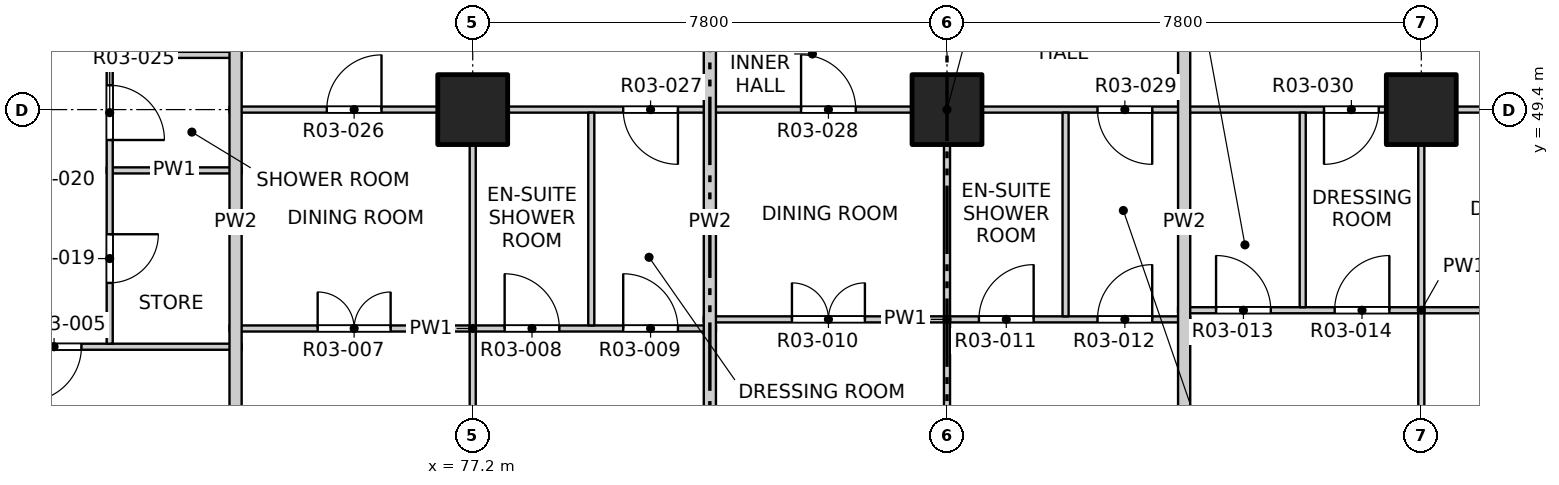
"""IFC4 building model, lengths in metres.
Left out: names, types, materials, properties, quantities, classifications, styles, units other than length and angle.
Written with IfcOpenShell. Run it as: python <this file> out.ifc"""

import sys

from ifc_helpers import new_model, si_unit, direction, frame, frame_2d, origin, origin_2d, place, context, subcontext, project, spatial, rectangle, extrude, element, fill, save


model = new_model("IFC4")
c1 = context("Model", 3, precision=1e-05, world=origin(), true_north=direction((0.0, 1.0)))
c2 = subcontext(c1, "Body", "Model", "MODEL_VIEW")
j1 = project(units=[si_unit("LENGTHUNIT", "METRE"), si_unit("PLANEANGLEUNIT", "RADIAN")], contexts=[c1])
p1 = place(None, origin())
s1 = spatial("IfcSite", under=j1, at=p1, CompositionType="ELEMENT")
p2 = place(p1, origin())
s2 = spatial("IfcBuilding", under=s1, at=p2, CompositionType="ELEMENT")
p3 = place(p2, frame((0.0, 0.0, 43.3)))
s3 = spatial("IfcBuildingStorey", under=s2, at=p3, CompositionType="ELEMENT", Elevation=43.3)
for number, where, z_axis, x_axis in (
    (1, (77.2, 49.4, -0.25), (0.0, 0.0, 1.0), (1.0, 0.0, 0.0)),
    (2, (85.0, 49.4, -0.25), (0.0, 0.0, 1.0), (1.0, 0.0, 0.0)),
    (3, (92.8, 49.4, -0.25), (0.0, 0.0, 1.0), (1.0, 0.0, 0.0)),
):
    element("IfcColumn", number, at=place(p3, frame(where, z_axis=z_axis, x_axis=x_axis)), inside=s3, PredefinedType="COLUMN", context=c2, shape_type="SweptSolid", body=[
        extrude(rectangle(XDim=1.15, YDim=1.15, at=origin_2d()), origin(), (0.0, 0.0, 1.0), 3.35),
    ])
p4 = place(p3, frame((61.9, 45.5, 0.0), z_axis=(0.0, 0.0, 1.0), x_axis=(1.0, 0.0, 0.0)))
e4 = element("IfcWall", 4, at=p4, inside=s3, PredefinedType="PARTITIONING", context=c2, shape_type="SweptSolid", body=[
    extrude(rectangle(XDim=11.5, YDim=0.1, at=frame_2d((5.75, 0.0))), origin(), (0.0, 0.0, 1.0), 3.1),
])
p5 = place(p4, frame((7.965, 0.0, 0.0)))
e5 = element("IfcOpeningElement", 5, at=p5, cuts=e4, PredefinedType="OPENING", context=c2, shape_type="SweptSolid", body=[
    extrude(rectangle(XDim=0.9, YDim=2.1, at=frame_2d((0.45, 1.05))), frame((0.0, 0.06, 0.0), z_axis=(0.0, -1.0, 0.0), x_axis=(1.0, 0.0, 0.0)), (0.0, 0.0, 1.0), 0.12),
])
p6 = place(p3, frame((73.2, 45.8, 0.0), z_axis=(0.0, 0.0, 1.0), x_axis=(1.0, 0.0, 0.0)))
e6 = element("IfcWall", 6, at=p6, inside=s3, PredefinedType="PARTITIONING", context=c2, shape_type="SweptSolid", body=[
    extrude(rectangle(XDim=8.0, YDim=0.1, at=frame_2d((4.0, 0.0))), origin(), (0.0, 0.0, 1.0), 3.1),
])
p7 = place(p6, frame((1.45, 0.0, 0.0)))
e7 = element("IfcOpeningElement", 7, at=p7, cuts=e6, PredefinedType="OPENING", context=c2, shape_type="SweptSolid", body=[
    extrude(rectangle(XDim=1.2, YDim=2.1, at=frame_2d((0.6, 1.05))), frame((0.0, 0.06, 0.0), z_axis=(0.0, -1.0, 0.0), x_axis=(1.0, 0.0, 0.0)), (0.0, 0.0, 1.0), 0.12),
])
p8 = place(p6, frame((4.525, 0.0, 0.0)))
e8 = element("IfcOpeningElement", 8, at=p8, cuts=e6, PredefinedType="OPENING", context=c2, shape_type="SweptSolid", body=[
    extrude(rectangle(XDim=0.9, YDim=2.1, at=frame_2d((0.45, 1.05))), frame((0.0, 0.06, 0.0), z_axis=(0.0, -1.0, 0.0), x_axis=(1.0, 0.0, 0.0)), (0.0, 0.0, 1.0), 0.12),
])
p9 = place(p6, frame((6.475, 0.0, 0.0)))
e9 = element("IfcOpeningElement", 9, at=p9, cuts=e6, PredefinedType="OPENING", context=c2, shape_type="SweptSolid", body=[
    extrude(rectangle(XDim=0.9, YDim=2.1, at=frame_2d((0.45, 1.05))), frame((0.0, 0.06, 0.0), z_axis=(0.0, -1.0, 0.0), x_axis=(1.0, 0.0, 0.0)), (0.0, 0.0, 1.0), 0.12),
])
p10 = place(p3, frame((81.0, 45.95, 0.0), z_axis=(0.0, 0.0, 1.0), x_axis=(1.0, 0.0, 0.0)))
e10 = element("IfcWall", 10, at=p10, inside=s3, PredefinedType="PARTITIONING", context=c2, shape_type="SweptSolid", body=[
    extrude(rectangle(XDim=8.0, YDim=0.1, at=frame_2d((4.0, 0.0))), origin(), (0.0, 0.0, 1.0), 3.1),
])
p11 = place(p10, frame((1.45, 0.0, 0.0)))
e11 = element("IfcOpeningElement", 11, at=p11, cuts=e10, PredefinedType="OPENING", context=c2, shape_type="SweptSolid", body=[
    extrude(rectangle(XDim=1.2, YDim=2.1, at=frame_2d((0.6, 1.05))), frame((0.0, 0.06, 0.0), z_axis=(0.0, -1.0, 0.0), x_axis=(1.0, 0.0, 0.0)), (0.0, 0.0, 1.0), 0.12),
])
p12 = place(p10, frame((4.525, 0.0, 0.0)))
e12 = element("IfcOpeningElement", 12, at=p12, cuts=e10, PredefinedType="OPENING", context=c2, shape_type="SweptSolid", body=[
    extrude(rectangle(XDim=0.9, YDim=2.1, at=frame_2d((0.45, 1.05))), frame((0.0, 0.06, 0.0), z_axis=(0.0, -1.0, 0.0), x_axis=(1.0, 0.0, 0.0)), (0.0, 0.0, 1.0), 0.12),
])
p13 = place(p10, frame((6.475, 0.0, 0.0)))
e13 = element("IfcOpeningElement", 13, at=p13, cuts=e10, PredefinedType="OPENING", context=c2, shape_type="SweptSolid", body=[
    extrude(rectangle(XDim=0.9, YDim=2.1, at=frame_2d((0.45, 1.05))), frame((0.0, 0.06, 0.0), z_axis=(0.0, -1.0, 0.0), x_axis=(1.0, 0.0, 0.0)), (0.0, 0.0, 1.0), 0.12),
])
p14 = place(p3, frame((88.8, 46.1, 0.0), z_axis=(0.0, 0.0, 1.0), x_axis=(1.0, 0.0, 0.0)))
e14 = element("IfcWall", 14, at=p14, inside=s3, PredefinedType="PARTITIONING", context=c2, shape_type="SweptSolid", body=[
    extrude(rectangle(XDim=8.0, YDim=0.1, at=frame_2d((4.0, 0.0))), origin(), (0.0, 0.0, 1.0), 3.1),
])
p15 = place(p14, frame((0.625, 0.0, 0.0)))
e15 = element("IfcOpeningElement", 15, at=p15, cuts=e14, PredefinedType="OPENING", context=c2, shape_type="SweptSolid", body=[
    extrude(rectangle(XDim=0.9, YDim=2.1, at=frame_2d((0.45, 1.05))), frame((0.0, 0.06, 0.0), z_axis=(0.0, -1.0, 0.0), x_axis=(1.0, 0.0, 0.0)), (0.0, 0.0, 1.0), 0.12),
])
p16 = place(p14, frame((2.575, 0.0, 0.0)))
e16 = element("IfcOpeningElement", 16, at=p16, cuts=e14, PredefinedType="OPENING", context=c2, shape_type="SweptSolid", body=[
    extrude(rectangle(XDim=0.9, YDim=2.1, at=frame_2d((0.45, 1.05))), frame((0.0, 0.06, 0.0), z_axis=(0.0, -1.0, 0.0), x_axis=(1.0, 0.0, 0.0)), (0.0, 0.0, 1.0), 0.12),
])
p17 = place(p14, frame((5.35, 0.0, 0.0)))
e17 = element("IfcOpeningElement", 17, at=p17, cuts=e14, PredefinedType="OPENING", context=c2, shape_type="SweptSolid", body=[
    extrude(rectangle(XDim=1.2, YDim=2.1, at=frame_2d((0.6, 1.05))), frame((0.0, 0.06, 0.0), z_axis=(0.0, -1.0, 0.0), x_axis=(1.0, 0.0, 0.0)), (0.0, 0.0, 1.0), 0.12),
])
p18 = place(p3, frame((71.18, 48.4, 0.0), z_axis=(0.0, 0.0, 1.0), x_axis=(1.0, 0.0, 0.0)))
e18 = element("IfcWall", 18, at=p18, inside=s3, PredefinedType="PARTITIONING", context=c2, shape_type="SweptSolid", body=[
    extrude(rectangle(XDim=2.22, YDim=0.1, at=frame_2d((1.11, 0.0))), origin(), (0.0, 0.0, 1.0), 3.1),
])
p19 = place(p3, frame((73.2, 49.4, 0.0), z_axis=(0.0, 0.0, 1.0), x_axis=(1.0, 0.0, 0.0)))
e19 = element("IfcWall", 19, at=p19, inside=s3, PredefinedType="PARTITIONING", context=c2, shape_type="SweptSolid", body=[
    extrude(rectangle(XDim=23.6, YDim=0.1, at=frame_2d((11.8, 0.0))), origin(), (0.0, 0.0, 1.0), 3.1),
])
p20 = place(p19, frame((1.6, 0.0, 0.0)))
e20 = element("IfcOpeningElement", 20, at=p20, cuts=e19, PredefinedType="OPENING", context=c2, shape_type="SweptSolid", body=[
    extrude(rectangle(XDim=0.9, YDim=2.1, at=frame_2d((0.45, 1.05))), frame((0.0, 0.06, 0.0), z_axis=(0.0, -1.0, 0.0), x_axis=(1.0, 0.0, 0.0)), (0.0, 0.0, 1.0), 0.12),
])
p21 = place(p19, frame((6.475, 0.0, 0.0)))
e21 = element("IfcOpeningElement", 21, at=p21, cuts=e19, PredefinedType="OPENING", context=c2, shape_type="SweptSolid", body=[
    extrude(rectangle(XDim=0.9, YDim=2.1, at=frame_2d((0.45, 1.05))), frame((0.0, 0.06, 0.0), z_axis=(0.0, -1.0, 0.0), x_axis=(1.0, 0.0, 0.0)), (0.0, 0.0, 1.0), 0.12),
])
p22 = place(p19, frame((9.4, 0.0, 0.0)))
e22 = element("IfcOpeningElement", 22, at=p22, cuts=e19, PredefinedType="OPENING", context=c2, shape_type="SweptSolid", body=[
    extrude(rectangle(XDim=0.9, YDim=2.1, at=frame_2d((0.45, 1.05))), frame((0.0, 0.06, 0.0), z_axis=(0.0, -1.0, 0.0), x_axis=(1.0, 0.0, 0.0)), (0.0, 0.0, 1.0), 0.12),
])
p23 = place(p19, frame((14.275, 0.0, 0.0)))
e23 = element("IfcOpeningElement", 23, at=p23, cuts=e19, PredefinedType="OPENING", context=c2, shape_type="SweptSolid", body=[
    extrude(rectangle(XDim=0.9, YDim=2.1, at=frame_2d((0.45, 1.05))), frame((0.0, 0.06, 0.0), z_axis=(0.0, -1.0, 0.0), x_axis=(1.0, 0.0, 0.0)), (0.0, 0.0, 1.0), 0.12),
])
p24 = place(p19, frame((18.0, 0.0, 0.0)))
e24 = element("IfcOpeningElement", 24, at=p24, cuts=e19, PredefinedType="OPENING", context=c2, shape_type="SweptSolid", body=[
    extrude(rectangle(XDim=0.9, YDim=2.1, at=frame_2d((0.45, 1.05))), frame((0.0, 0.06, 0.0), z_axis=(0.0, -1.0, 0.0), x_axis=(1.0, 0.0, 0.0)), (0.0, 0.0, 1.0), 0.12),
])
p25 = place(p19, frame((21.1, 0.0, 0.0)))
e25 = element("IfcOpeningElement", 25, at=p25, cuts=e19, PredefinedType="OPENING", context=c2, shape_type="SweptSolid", body=[
    extrude(rectangle(XDim=0.9, YDim=2.1, at=frame_2d((0.45, 1.05))), frame((0.0, 0.06, 0.0), z_axis=(0.0, -1.0, 0.0), x_axis=(1.0, 0.0, 0.0)), (0.0, 0.0, 1.0), 0.12),
])
p26 = place(p3, frame((71.18, 50.3, 0.0), z_axis=(0.0, 0.0, 1.0), x_axis=(1.0, 0.0, 0.0)))
e26 = element("IfcWall", 26, at=p26, inside=s3, PredefinedType="PARTITIONING", context=c2, shape_type="SweptSolid", body=[
    extrude(rectangle(XDim=2.22, YDim=0.1, at=frame_2d((1.11, 0.0))), origin(), (0.0, 0.0, 1.0), 3.1),
])
p27 = place(p3, frame((71.23, 45.55, 0.0), z_axis=(0.0, 0.0, 1.0), x_axis=(0.0, 1.0, 0.0)))
e27 = element("IfcWall", 27, at=p27, inside=s3, PredefinedType="PARTITIONING", context=c2, shape_type="SweptSolid", body=[
    extrude(rectangle(XDim=12.3, YDim=0.1, at=frame_2d((6.15, 0.0))), origin(), (0.0, 0.0, 1.0), 3.1),
])
p28 = place(p27, frame((1.0, 0.0, 0.0)))
e28 = element("IfcOpeningElement", 28, at=p28, cuts=e27, PredefinedType="OPENING", context=c2, shape_type="SweptSolid", body=[
    extrude(rectangle(XDim=0.8, YDim=2.1, at=frame_2d((0.4, 1.05))), frame((0.0, 0.06, 0.0), z_axis=(0.0, -1.0, 0.0), x_axis=(1.0, 0.0, 0.0)), (0.0, 0.0, 1.0), 0.12),
])
p29 = place(p27, frame((3.35, 0.0, 0.0)))
e29 = element("IfcOpeningElement", 29, at=p29, cuts=e27, PredefinedType="OPENING", context=c2, shape_type="SweptSolid", body=[
    extrude(rectangle(XDim=0.9, YDim=2.1, at=frame_2d((0.45, 1.05))), frame((0.0, 0.06, 0.0), z_axis=(0.0, -1.0, 0.0), x_axis=(1.0, 0.0, 0.0)), (0.0, 0.0, 1.0), 0.12),
])
p30 = place(p27, frame((5.8, 0.0, 0.0)))
e30 = element("IfcOpeningElement", 30, at=p30, cuts=e27, PredefinedType="OPENING", context=c2, shape_type="SweptSolid", body=[
    extrude(rectangle(XDim=0.8, YDim=2.1, at=frame_2d((0.4, 1.05))), frame((0.0, 0.06, 0.0), z_axis=(0.0, -1.0, 0.0), x_axis=(1.0, 0.0, 0.0)), (0.0, 0.0, 1.0), 0.12),
])
p31 = place(p27, frame((8.4, 0.0, 0.0)))
e31 = element("IfcOpeningElement", 31, at=p31, cuts=e27, PredefinedType="OPENING", context=c2, shape_type="SweptSolid", body=[
    extrude(rectangle(XDim=0.8, YDim=2.1, at=frame_2d((0.4, 1.05))), frame((0.0, 0.06, 0.0), z_axis=(0.0, -1.0, 0.0), x_axis=(1.0, 0.0, 0.0)), (0.0, 0.0, 1.0), 0.12),
])
p32 = place(p27, frame((10.7, 0.0, 0.0)))
e32 = element("IfcOpeningElement", 32, at=p32, cuts=e27, PredefinedType="OPENING", context=c2, shape_type="SweptSolid", body=[
    extrude(rectangle(XDim=0.9, YDim=2.1, at=frame_2d((0.45, 1.05))), frame((0.0, 0.06, 0.0), z_axis=(0.0, -1.0, 0.0), x_axis=(1.0, 0.0, 0.0)), (0.0, 0.0, 1.0), 0.12),
])
p33 = place(p3, frame((73.3, 41.9, 0.0), z_axis=(0.0, 0.0, 1.0), x_axis=(0.0, 1.0, 0.0)))
e33 = element("IfcWall", 33, at=p33, inside=s3, PredefinedType="PARTITIONING", context=c2, shape_type="SweptSolid", body=[
    extrude(rectangle(XDim=11.3, YDim=0.2, at=frame_2d((5.65, 0.0))), origin(), (0.0, 0.0, 1.0), 3.1),
])
p34 = place(p3, frame((77.2, 41.9, 0.0), z_axis=(0.0, 0.0, 1.0), x_axis=(0.0, 1.0, 0.0)))
e34 = element("IfcWall", 34, at=p34, inside=s3, PredefinedType="PARTITIONING", context=c2, shape_type="SweptSolid", body=[
    extrude(rectangle(XDim=7.45, YDim=0.1, at=frame_2d((3.725, 0.0))), origin(), (0.0, 0.0, 1.0), 3.1),
])
p35 = place(p3, frame((79.15, 45.85, 0.0), z_axis=(0.0, 0.0, 1.0), x_axis=(0.0, 1.0, 0.0)))
e35 = element("IfcWall", 35, at=p35, inside=s3, PredefinedType="PARTITIONING", context=c2, shape_type="SweptSolid", body=[
    extrude(rectangle(XDim=3.5, YDim=0.1, at=frame_2d((1.75, 0.0))), origin(), (0.0, 0.0, 1.0), 3.1),
])
p36 = place(p3, frame((81.1, 41.9, 0.0), z_axis=(0.0, 0.0, 1.0), x_axis=(0.0, 1.0, 0.0)))
e36 = element("IfcWall", 36, at=p36, inside=s3, PredefinedType="PARTITIONING", context=c2, shape_type="SweptSolid", body=[
    extrude(rectangle(XDim=11.3, YDim=0.2, at=frame_2d((5.65, 0.0))), origin(), (0.0, 0.0, 1.0), 3.1),
])
p37 = place(p3, frame((85.0, 41.9, 0.0), z_axis=(0.0, 0.0, 1.0), x_axis=(0.0, 1.0, 0.0)))
e37 = element("IfcWall", 37, at=p37, inside=s3, PredefinedType="PARTITIONING", context=c2, shape_type="SweptSolid", body=[
    extrude(rectangle(XDim=7.45, YDim=0.1, at=frame_2d((3.725, 0.0))), origin(), (0.0, 0.0, 1.0), 3.1),
])
p38 = place(p3, frame((86.95, 46.0, 0.0), z_axis=(0.0, 0.0, 1.0), x_axis=(0.0, 1.0, 0.0)))
e38 = element("IfcWall", 38, at=p38, inside=s3, PredefinedType="PARTITIONING", context=c2, shape_type="SweptSolid", body=[
    extrude(rectangle(XDim=3.35, YDim=0.1, at=frame_2d((1.675, 0.0))), origin(), (0.0, 0.0, 1.0), 3.1),
])
p39 = place(p3, frame((88.9, 41.9, 0.0), z_axis=(0.0, 0.0, 1.0), x_axis=(0.0, 1.0, 0.0)))
e39 = element("IfcWall", 39, at=p39, inside=s3, PredefinedType="PARTITIONING", context=c2, shape_type="SweptSolid", body=[
    extrude(rectangle(XDim=11.3, YDim=0.2, at=frame_2d((5.65, 0.0))), origin(), (0.0, 0.0, 1.0), 3.1),
])
p40 = place(p3, frame((90.85, 46.15, 0.0), z_axis=(0.0, 0.0, 1.0), x_axis=(0.0, 1.0, 0.0)))
e40 = element("IfcWall", 40, at=p40, inside=s3, PredefinedType="PARTITIONING", context=c2, shape_type="SweptSolid", body=[
    extrude(rectangle(XDim=3.2, YDim=0.1, at=frame_2d((1.6, 0.0))), origin(), (0.0, 0.0, 1.0), 3.1),
])
p41 = place(p3, frame((92.8, 41.9, 0.0), z_axis=(0.0, 0.0, 1.0), x_axis=(0.0, 1.0, 0.0)))
e41 = element("IfcWall", 41, at=p41, inside=s3, PredefinedType="PARTITIONING", context=c2, shape_type="SweptSolid", body=[
    extrude(rectangle(XDim=7.45, YDim=0.1, at=frame_2d((3.725, 0.0))), origin(), (0.0, 0.0, 1.0), 3.1),
])
p42 = place(p5, origin())
e42 = element("IfcDoor", 42, at=p42, inside=s3, OperationType="SINGLE_SWING_RIGHT", PredefinedType="DOOR", context=c2, shape_type="SweptSolid", body=[
    extrude(rectangle(XDim=0.9, YDim=2.1, at=frame_2d((0.45, 1.05))), frame((0.0, 0.025, 0.0), z_axis=(0.0, -1.0, 0.0), x_axis=(1.0, 0.0, 0.0)), (0.0, 0.0, 1.0), 0.05),
])
fill(e5, e42)
p43 = place(p7, origin())
e43 = element("IfcDoor", 43, at=p43, inside=s3, OperationType="DOUBLE_DOOR_SINGLE_SWING", PredefinedType="DOOR", context=c2, shape_type="SweptSolid", body=[
    extrude(rectangle(XDim=1.2, YDim=2.1, at=frame_2d((0.6, 1.05))), frame((0.0, 0.025, 0.0), z_axis=(0.0, -1.0, 0.0), x_axis=(1.0, 0.0, 0.0)), (0.0, 0.0, 1.0), 0.05),
])
fill(e7, e43)
p44 = place(p8, origin())
e44 = element("IfcDoor", 44, at=p44, inside=s3, OperationType="SINGLE_SWING_LEFT", PredefinedType="DOOR", context=c2, shape_type="SweptSolid", body=[
    extrude(rectangle(XDim=0.9, YDim=2.1, at=frame_2d((0.45, 1.05))), frame((0.0, 0.025, 0.0), z_axis=(0.0, -1.0, 0.0), x_axis=(1.0, 0.0, 0.0)), (0.0, 0.0, 1.0), 0.05),
])
fill(e8, e44)
p45 = place(p9, origin())
e45 = element("IfcDoor", 45, at=p45, inside=s3, OperationType="SINGLE_SWING_LEFT", PredefinedType="DOOR", context=c2, shape_type="SweptSolid", body=[
    extrude(rectangle(XDim=0.9, YDim=2.1, at=frame_2d((0.45, 1.05))), frame((0.0, 0.025, 0.0), z_axis=(0.0, -1.0, 0.0), x_axis=(1.0, 0.0, 0.0)), (0.0, 0.0, 1.0), 0.05),
])
fill(e9, e45)
p46 = place(p11, origin())
e46 = element("IfcDoor", 46, at=p46, inside=s3, OperationType="DOUBLE_DOOR_SINGLE_SWING", PredefinedType="DOOR", context=c2, shape_type="SweptSolid", body=[
    extrude(rectangle(XDim=1.2, YDim=2.1, at=frame_2d((0.6, 1.05))), frame((0.0, 0.025, 0.0), z_axis=(0.0, -1.0, 0.0), x_axis=(1.0, 0.0, 0.0)), (0.0, 0.0, 1.0), 0.05),
])
fill(e11, e46)
p47 = place(p12, origin())
e47 = element("IfcDoor", 47, at=p47, inside=s3, OperationType="SINGLE_SWING_RIGHT", PredefinedType="DOOR", context=c2, shape_type="SweptSolid", body=[
    extrude(rectangle(XDim=0.9, YDim=2.1, at=frame_2d((0.45, 1.05))), frame((0.0, 0.025, 0.0), z_axis=(0.0, -1.0, 0.0), x_axis=(1.0, 0.0, 0.0)), (0.0, 0.0, 1.0), 0.05),
])
fill(e12, e47)
p48 = place(p13, origin())
e48 = element("IfcDoor", 48, at=p48, inside=s3, OperationType="SINGLE_SWING_RIGHT", PredefinedType="DOOR", context=c2, shape_type="SweptSolid", body=[
    extrude(rectangle(XDim=0.9, YDim=2.1, at=frame_2d((0.45, 1.05))), frame((0.0, 0.025, 0.0), z_axis=(0.0, -1.0, 0.0), x_axis=(1.0, 0.0, 0.0)), (0.0, 0.0, 1.0), 0.05),
])
fill(e13, e48)
p49 = place(p15, origin())
e49 = element("IfcDoor", 49, at=p49, inside=s3, OperationType="SINGLE_SWING_LEFT", PredefinedType="DOOR", context=c2, shape_type="SweptSolid", body=[
    extrude(rectangle(XDim=0.9, YDim=2.1, at=frame_2d((0.45, 1.05))), frame((0.0, 0.025, 0.0), z_axis=(0.0, -1.0, 0.0), x_axis=(1.0, 0.0, 0.0)), (0.0, 0.0, 1.0), 0.05),
])
fill(e15, e49)
p50 = place(p16, origin())
e50 = element("IfcDoor", 50, at=p50, inside=s3, OperationType="SINGLE_SWING_RIGHT", PredefinedType="DOOR", context=c2, shape_type="SweptSolid", body=[
    extrude(rectangle(XDim=0.9, YDim=2.1, at=frame_2d((0.45, 1.05))), frame((0.0, 0.025, 0.0), z_axis=(0.0, -1.0, 0.0), x_axis=(1.0, 0.0, 0.0)), (0.0, 0.0, 1.0), 0.05),
])
fill(e16, e50)
p51 = place(p28, origin())
e51 = element("IfcDoor", 51, at=p51, inside=s3, OperationType="SINGLE_SWING_LEFT", PredefinedType="DOOR", context=c2, shape_type="SweptSolid", body=[
    extrude(rectangle(XDim=0.8, YDim=2.1, at=frame_2d((0.4, 1.05))), frame((0.0, 0.025, 0.0), z_axis=(0.0, -1.0, 0.0), x_axis=(1.0, 0.0, 0.0)), (0.0, 0.0, 1.0), 0.05),
])
fill(e28, e51)
p52 = place(p29, origin())
e52 = element("IfcDoor", 52, at=p52, inside=s3, OperationType="SINGLE_SWING_RIGHT", PredefinedType="DOOR", context=c2, shape_type="SweptSolid", body=[
    extrude(rectangle(XDim=0.9, YDim=2.1, at=frame_2d((0.45, 1.05))), frame((0.0, 0.025, 0.0), z_axis=(0.0, -1.0, 0.0), x_axis=(1.0, 0.0, 0.0)), (0.0, 0.0, 1.0), 0.05),
])
fill(e29, e52)
p53 = place(p20, origin())
e53 = element("IfcDoor", 53, at=p53, inside=s3, OperationType="SINGLE_SWING_RIGHT", PredefinedType="DOOR", context=c2, shape_type="SweptSolid", body=[
    extrude(rectangle(XDim=0.9, YDim=2.1, at=frame_2d((0.45, 1.05))), frame((0.0, 0.025, 0.0), z_axis=(0.0, -1.0, 0.0), x_axis=(1.0, 0.0, 0.0)), (0.0, 0.0, 1.0), 0.05),
])
fill(e20, e53)
p54 = place(p21, origin())
e54 = element("IfcDoor", 54, at=p54, inside=s3, OperationType="SINGLE_SWING_LEFT", PredefinedType="DOOR", context=c2, shape_type="SweptSolid", body=[
    extrude(rectangle(XDim=0.9, YDim=2.1, at=frame_2d((0.45, 1.05))), frame((0.0, 0.025, 0.0), z_axis=(0.0, -1.0, 0.0), x_axis=(1.0, 0.0, 0.0)), (0.0, 0.0, 1.0), 0.05),
])
fill(e21, e54)
p55 = place(p22, origin())
e55 = element("IfcDoor", 55, at=p55, inside=s3, OperationType="SINGLE_SWING_LEFT", PredefinedType="DOOR", context=c2, shape_type="SweptSolid", body=[
    extrude(rectangle(XDim=0.9, YDim=2.1, at=frame_2d((0.45, 1.05))), frame((0.0, 0.025, 0.0), z_axis=(0.0, -1.0, 0.0), x_axis=(1.0, 0.0, 0.0)), (0.0, 0.0, 1.0), 0.05),
])
fill(e22, e55)
p56 = place(p23, origin())
e56 = element("IfcDoor", 56, at=p56, inside=s3, OperationType="SINGLE_SWING_LEFT", PredefinedType="DOOR", context=c2, shape_type="SweptSolid", body=[
    extrude(rectangle(XDim=0.9, YDim=2.1, at=frame_2d((0.45, 1.05))), frame((0.0, 0.025, 0.0), z_axis=(0.0, -1.0, 0.0), x_axis=(1.0, 0.0, 0.0)), (0.0, 0.0, 1.0), 0.05),
])
fill(e23, e56)
p57 = place(p24, origin())
e57 = element("IfcDoor", 57, at=p57, inside=s3, OperationType="SINGLE_SWING_RIGHT", PredefinedType="DOOR", context=c2, shape_type="SweptSolid", body=[
    extrude(rectangle(XDim=0.9, YDim=2.1, at=frame_2d((0.45, 1.05))), frame((0.0, 0.025, 0.0), z_axis=(0.0, -1.0, 0.0), x_axis=(1.0, 0.0, 0.0)), (0.0, 0.0, 1.0), 0.05),
])
fill(e24, e57)
save(model, sys.argv[1])
